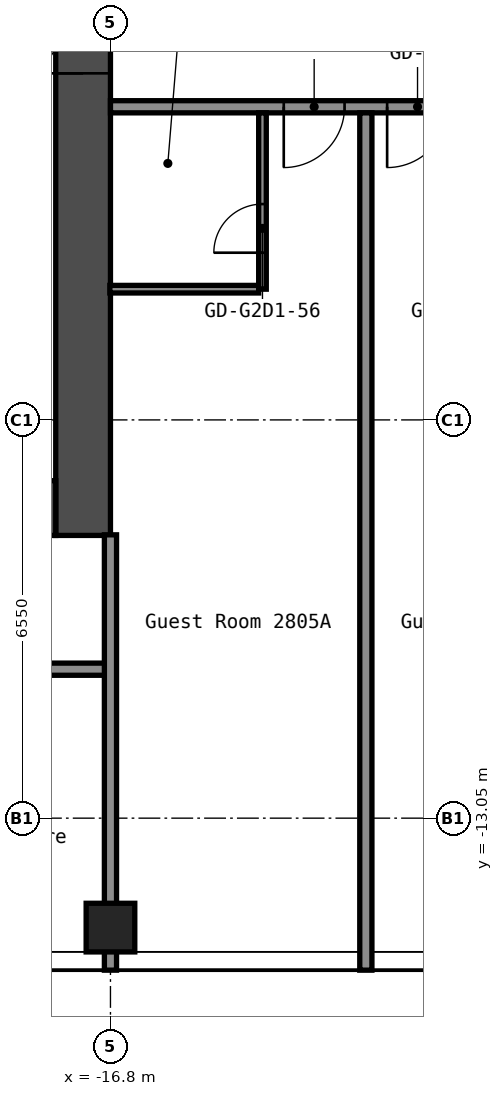
"""IFC4 building model, lengths in metres.
Left out: names, types, materials, properties, quantities, classifications, styles, units other than length and angle.
Written with IfcOpenShell. Run it as: python <this file> out.ifc"""

import sys

from ifc_helpers import new_model, si_unit, direction, frame, frame_2d, origin, origin_2d, place, context, subcontext, project, spatial, rectangle, hollow_rectangle, extrude, element, fill, save


model = new_model("IFC4")
c1 = context("Model", 3, precision=1e-05, world=origin(), true_north=direction((0.0, 1.0)))
c2 = subcontext(c1, "Body", "Model", "MODEL_VIEW")
j1 = project(units=[si_unit("LENGTHUNIT", "METRE"), si_unit("PLANEANGLEUNIT", "RADIAN")], contexts=[c1])
p1 = place(None, origin())
s1 = spatial("IfcSite", under=j1, at=p1, CompositionType="ELEMENT")
p2 = place(p1, origin())
s2 = spatial("IfcBuilding", under=s1, at=p2, CompositionType="ELEMENT")
p3 = place(p2, frame((0.0, 0.0, 101.0)))
s3 = spatial("IfcBuildingStorey", under=s2, at=p3, CompositionType="ELEMENT", Elevation=101.0)
p4 = place(p3, frame((-16.8, -14.85, 0.0), z_axis=(0.0, 0.0, 1.0), x_axis=(1.0, 0.0, 0.0)))
e1 = element("IfcColumn", 1, at=p4, inside=s3, PredefinedType="COLUMN", context=c2, shape_type="SweptSolid", body=[
    extrude(hollow_rectangle(XDim=0.8, YDim=0.8, WallThickness=0.032, at=origin_2d()), origin(), (0.0, 0.0, 1.0), 2.8),
])
p5 = place(p3, frame((-17.25, -8.4, 0.0), z_axis=(0.0, 0.0, 1.0), x_axis=(0.0, 1.0, 0.0)))
e2 = element("IfcWall", 2, at=p5, inside=s3, PredefinedType="SHEAR", context=c2, shape_type="SweptSolid", body=[
    extrude(rectangle(XDim=16.8, YDim=0.9, at=frame_2d((8.4, 0.0))), origin(), (0.0, 0.0, 1.0), 2.8),
])
p6 = place(p5, frame((7.6, 0.0, 0.0)))
e3 = element("IfcOpeningElement", 3, at=p6, cuts=e2, PredefinedType="OPENING", context=c2, shape_type="SweptSolid", body=[
    extrude(rectangle(XDim=1.2, YDim=2.1, at=frame_2d((0.6, 1.05))), frame((0.0, 0.46, 0.0), z_axis=(0.0, -1.0, 0.0), x_axis=(1.0, 0.0, 0.0)), (0.0, 0.0, 1.0), 0.92),
])
p7 = place(p3, frame((-32.7, -7.95, 0.0), z_axis=(0.0, 0.0, 1.0), x_axis=(1.0, 0.0, 0.0)))
e4 = element("IfcWall", 4, at=p7, inside=s3, PredefinedType="SHEAR", context=c2, shape_type="SweptSolid", body=[
    extrude(rectangle(XDim=15.0, YDim=0.9, at=frame_2d((7.5, 0.0))), origin(), (0.0, 0.0, 1.0), 2.8),
])
p8 = place(p7, frame((11.45, 0.0, 0.0)))
e5 = element("IfcOpeningElement", 5, at=p8, cuts=e4, PredefinedType="OPENING", context=c2, shape_type="SweptSolid", body=[
    extrude(rectangle(XDim=1.0, YDim=2.1, at=frame_2d((0.5, 1.05))), frame((0.0, 0.46, 0.0), z_axis=(0.0, -1.0, 0.0), x_axis=(1.0, 0.0, 0.0)), (0.0, 0.0, 1.0), 0.92),
])
p9 = place(p3, frame((-46.5, -10.6, 0.0), z_axis=(0.0, 0.0, 1.0), x_axis=(1.0, 0.0, 0.0)))
e6 = element("IfcWall", 6, at=p9, inside=s3, PredefinedType="PARTITIONING", context=c2, shape_type="SweptSolid", body=[
    extrude(rectangle(XDim=29.7, YDim=0.2, at=frame_2d((14.85, 0.0))), origin(), (0.0, 0.0, 1.0), 2.8),
])
p10 = place(p9, frame((1.95, 0.0, 0.0)))
e7 = element("IfcOpeningElement", 7, at=p10, cuts=e6, PredefinedType="OPENING", context=c2, shape_type="SweptSolid", body=[
    extrude(rectangle(XDim=0.9, YDim=2.1, at=frame_2d((0.45, 1.05))), frame((0.0, 0.11, 0.0), z_axis=(0.0, -1.0, 0.0), x_axis=(1.0, 0.0, 0.0)), (0.0, 0.0, 1.0), 0.22),
])
p11 = place(p9, frame((8.2, 0.0, 0.0)))
e8 = element("IfcOpeningElement", 8, at=p11, cuts=e6, PredefinedType="OPENING", context=c2, shape_type="SweptSolid", body=[
    extrude(rectangle(XDim=1.0, YDim=2.1, at=frame_2d((0.5, 1.05))), frame((0.0, 0.11, 0.0), z_axis=(0.0, -1.0, 0.0), x_axis=(1.0, 0.0, 0.0)), (0.0, 0.0, 1.0), 0.22),
])
p12 = place(p9, frame((14.72, 0.0, 0.0)))
e9 = element("IfcOpeningElement", 9, at=p12, cuts=e6, PredefinedType="OPENING", context=c2, shape_type="SweptSolid", body=[
    extrude(rectangle(XDim=0.9, YDim=2.1, at=frame_2d((0.45, 1.05))), frame((0.0, 0.11, 0.0), z_axis=(0.0, -1.0, 0.0), x_axis=(1.0, 0.0, 0.0)), (0.0, 0.0, 1.0), 0.22),
])
p13 = place(p9, frame((18.92, 0.0, 0.0)))
e10 = element("IfcOpeningElement", 10, at=p13, cuts=e6, PredefinedType="OPENING", context=c2, shape_type="SweptSolid", body=[
    extrude(rectangle(XDim=0.9, YDim=2.1, at=frame_2d((0.45, 1.05))), frame((0.0, 0.11, 0.0), z_axis=(0.0, -1.0, 0.0), x_axis=(1.0, 0.0, 0.0)), (0.0, 0.0, 1.0), 0.22),
])
p14 = place(p9, frame((22.36, 0.0, 0.0)))
e11 = element("IfcOpeningElement", 11, at=p14, cuts=e6, PredefinedType="OPENING", context=c2, shape_type="SweptSolid", body=[
    extrude(rectangle(XDim=0.9, YDim=2.1, at=frame_2d((0.45, 1.05))), frame((0.0, 0.11, 0.0), z_axis=(0.0, -1.0, 0.0), x_axis=(1.0, 0.0, 0.0)), (0.0, 0.0, 1.0), 0.22),
])
p15 = place(p9, frame((26.56, 0.0, 0.0)))
e12 = element("IfcOpeningElement", 12, at=p15, cuts=e6, PredefinedType="OPENING", context=c2, shape_type="SweptSolid", body=[
    extrude(rectangle(XDim=0.9, YDim=2.1, at=frame_2d((0.45, 1.05))), frame((0.0, 0.11, 0.0), z_axis=(0.0, -1.0, 0.0), x_axis=(1.0, 0.0, 0.0)), (0.0, 0.0, 1.0), 0.22),
])
p16 = place(p3, frame((-16.81, -4.35, 0.0), z_axis=(0.0, 0.0, 1.0), x_axis=(1.0, 0.0, 0.0)))
e13 = element("IfcWall", 13, at=p16, inside=s3, PredefinedType="PARTITIONING", context=c2, shape_type="SweptSolid", body=[
    extrude(rectangle(XDim=2.448, YDim=0.125, at=frame_2d((1.224, 0.0))), origin(), (0.0, 0.0, 1.0), 2.8),
])
p17 = place(p3, frame((-16.8, -1.35, 0.0), z_axis=(0.0, 0.0, 1.0), x_axis=(1.0, 0.0, 0.0)))
e14 = element("IfcWall", 14, at=p17, inside=s3, PredefinedType="PARTITIONING", context=c2, shape_type="SweptSolid", body=[
    extrude(rectangle(XDim=33.6, YDim=0.2, at=frame_2d((16.8, 0.0))), origin(), (0.0, 0.0, 1.0), 2.8),
])
p18 = place(p17, frame((2.85, 0.0, 0.0)))
e15 = element("IfcOpeningElement", 15, at=p18, cuts=e14, PredefinedType="OPENING", context=c2, shape_type="SweptSolid", body=[
    extrude(rectangle(XDim=1.0, YDim=2.1, at=frame_2d((0.5, 1.05))), frame((0.0, 0.11, 0.0), z_axis=(0.0, -1.0, 0.0), x_axis=(1.0, 0.0, 0.0)), (0.0, 0.0, 1.0), 0.22),
])
p19 = place(p17, frame((4.55, 0.0, 0.0)))
e16 = element("IfcOpeningElement", 16, at=p19, cuts=e14, PredefinedType="OPENING", context=c2, shape_type="SweptSolid", body=[
    extrude(rectangle(XDim=1.0, YDim=2.1, at=frame_2d((0.5, 1.05))), frame((0.0, 0.11, 0.0), z_axis=(0.0, -1.0, 0.0), x_axis=(1.0, 0.0, 0.0)), (0.0, 0.0, 1.0), 0.22),
])
p20 = place(p17, frame((12.1, 0.0, 0.0)))
e17 = element("IfcOpeningElement", 17, at=p20, cuts=e14, PredefinedType="OPENING", context=c2, shape_type="SweptSolid", body=[
    extrude(rectangle(XDim=1.0, YDim=2.1, at=frame_2d((0.5, 1.05))), frame((0.0, 0.11, 0.0), z_axis=(0.0, -1.0, 0.0), x_axis=(1.0, 0.0, 0.0)), (0.0, 0.0, 1.0), 0.22),
])
p21 = place(p17, frame((19.65, 0.0, 0.0)))
e18 = element("IfcOpeningElement", 18, at=p21, cuts=e14, PredefinedType="OPENING", context=c2, shape_type="SweptSolid", body=[
    extrude(rectangle(XDim=1.0, YDim=2.1, at=frame_2d((0.5, 1.05))), frame((0.0, 0.11, 0.0), z_axis=(0.0, -1.0, 0.0), x_axis=(1.0, 0.0, 0.0)), (0.0, 0.0, 1.0), 0.22),
])
p22 = place(p17, frame((21.35, 0.0, 0.0)))
e19 = element("IfcOpeningElement", 19, at=p22, cuts=e14, PredefinedType="OPENING", context=c2, shape_type="SweptSolid", body=[
    extrude(rectangle(XDim=1.0, YDim=2.1, at=frame_2d((0.5, 1.05))), frame((0.0, 0.11, 0.0), z_axis=(0.0, -1.0, 0.0), x_axis=(1.0, 0.0, 0.0)), (0.0, 0.0, 1.0), 0.22),
])
p23 = place(p17, frame((30.6, 0.0, 0.0)))
e20 = element("IfcOpeningElement", 20, at=p23, cuts=e14, PredefinedType="OPENING", context=c2, shape_type="SweptSolid", body=[
    extrude(rectangle(XDim=1.0, YDim=2.1, at=frame_2d((0.5, 1.05))), frame((0.0, 0.11, 0.0), z_axis=(0.0, -1.0, 0.0), x_axis=(1.0, 0.0, 0.0)), (0.0, 0.0, 1.0), 0.22),
])
p24 = place(p3, frame((-16.8, -15.55, 0.0), z_axis=(0.0, 0.0, 1.0), x_axis=(0.0, 1.0, 0.0)))
e21 = element("IfcWall", 21, at=p24, inside=s3, PredefinedType="PARTITIONING", context=c2, shape_type="SweptSolid", body=[
    extrude(rectangle(XDim=7.16, YDim=0.2, at=frame_2d((3.58, 0.0))), origin(), (0.0, 0.0, 1.0), 2.8),
])
p25 = place(p3, frame((-14.3, -4.35, 0.0), z_axis=(0.0, 0.0, 1.0), x_axis=(0.0, 1.0, 0.0)))
e22 = element("IfcWall", 22, at=p25, inside=s3, PredefinedType="PARTITIONING", context=c2, shape_type="SweptSolid", body=[
    extrude(rectangle(XDim=2.9, YDim=0.125, at=frame_2d((1.45, 0.0))), origin(), (0.0, 0.0, 1.0), 2.8),
])
p26 = place(p25, frame((0.6, 0.0, 0.0)))
e23 = element("IfcOpeningElement", 23, at=p26, cuts=e22, PredefinedType="OPENING", context=c2, shape_type="SweptSolid", body=[
    extrude(rectangle(XDim=0.8, YDim=2.1, at=frame_2d((0.4, 1.05))), frame((0.0, 0.073, 0.0), z_axis=(0.0, -1.0, 0.0), x_axis=(1.0, 0.0, 0.0)), (0.0, 0.0, 1.0), 0.145),
])
p27 = place(p3, frame((-12.6, -15.55, 0.0), z_axis=(0.0, 0.0, 1.0), x_axis=(0.0, 1.0, 0.0)))
e24 = element("IfcWall", 24, at=p27, inside=s3, PredefinedType="PARTITIONING", context=c2, shape_type="SweptSolid", body=[
    extrude(rectangle(XDim=14.1, YDim=0.2, at=frame_2d((7.05, 0.0))), origin(), (0.0, 0.0, 1.0), 2.8),
])
p28 = place(p6, origin())
e25 = element("IfcDoor", 25, at=p28, inside=s3, OperationType="DOUBLE_DOOR_SINGLE_SWING", PredefinedType="DOOR", context=c2, shape_type="SweptSolid", body=[
    extrude(rectangle(XDim=1.2, YDim=2.1, at=frame_2d((0.6, 1.05))), frame((0.0, 0.025, 0.0), z_axis=(0.0, -1.0, 0.0), x_axis=(1.0, 0.0, 0.0)), (0.0, 0.0, 1.0), 0.05),
])
fill(e3, e25)
p29 = place(p18, origin())
e26 = element("IfcDoor", 26, at=p29, inside=s3, OperationType="SINGLE_SWING_LEFT", PredefinedType="DOOR", context=c2, shape_type="SweptSolid", body=[
    extrude(rectangle(XDim=1.0, YDim=2.1, at=frame_2d((0.5, 1.05))), frame((0.0, 0.025, 0.0), z_axis=(0.0, -1.0, 0.0), x_axis=(1.0, 0.0, 0.0)), (0.0, 0.0, 1.0), 0.05),
])
fill(e15, e26)
p30 = place(p19, origin())
e27 = element("IfcDoor", 27, at=p30, inside=s3, OperationType="SINGLE_SWING_LEFT", PredefinedType="DOOR", context=c2, shape_type="SweptSolid", body=[
    extrude(rectangle(XDim=1.0, YDim=2.1, at=frame_2d((0.5, 1.05))), frame((0.0, 0.025, 0.0), z_axis=(0.0, -1.0, 0.0), x_axis=(1.0, 0.0, 0.0)), (0.0, 0.0, 1.0), 0.05),
])
fill(e16, e27)
p31 = place(p26, origin())
e28 = element("IfcDoor", 28, at=p31, inside=s3, OperationType="SINGLE_SWING_RIGHT", PredefinedType="DOOR", context=c2, shape_type="SweptSolid", body=[
    extrude(rectangle(XDim=0.8, YDim=2.1, at=frame_2d((0.4, 1.05))), frame((0.0, 0.025, 0.0), z_axis=(0.0, -1.0, 0.0), x_axis=(1.0, 0.0, 0.0)), (0.0, 0.0, 1.0), 0.05),
])
fill(e23, e28)
save(model, sys.argv[1])
